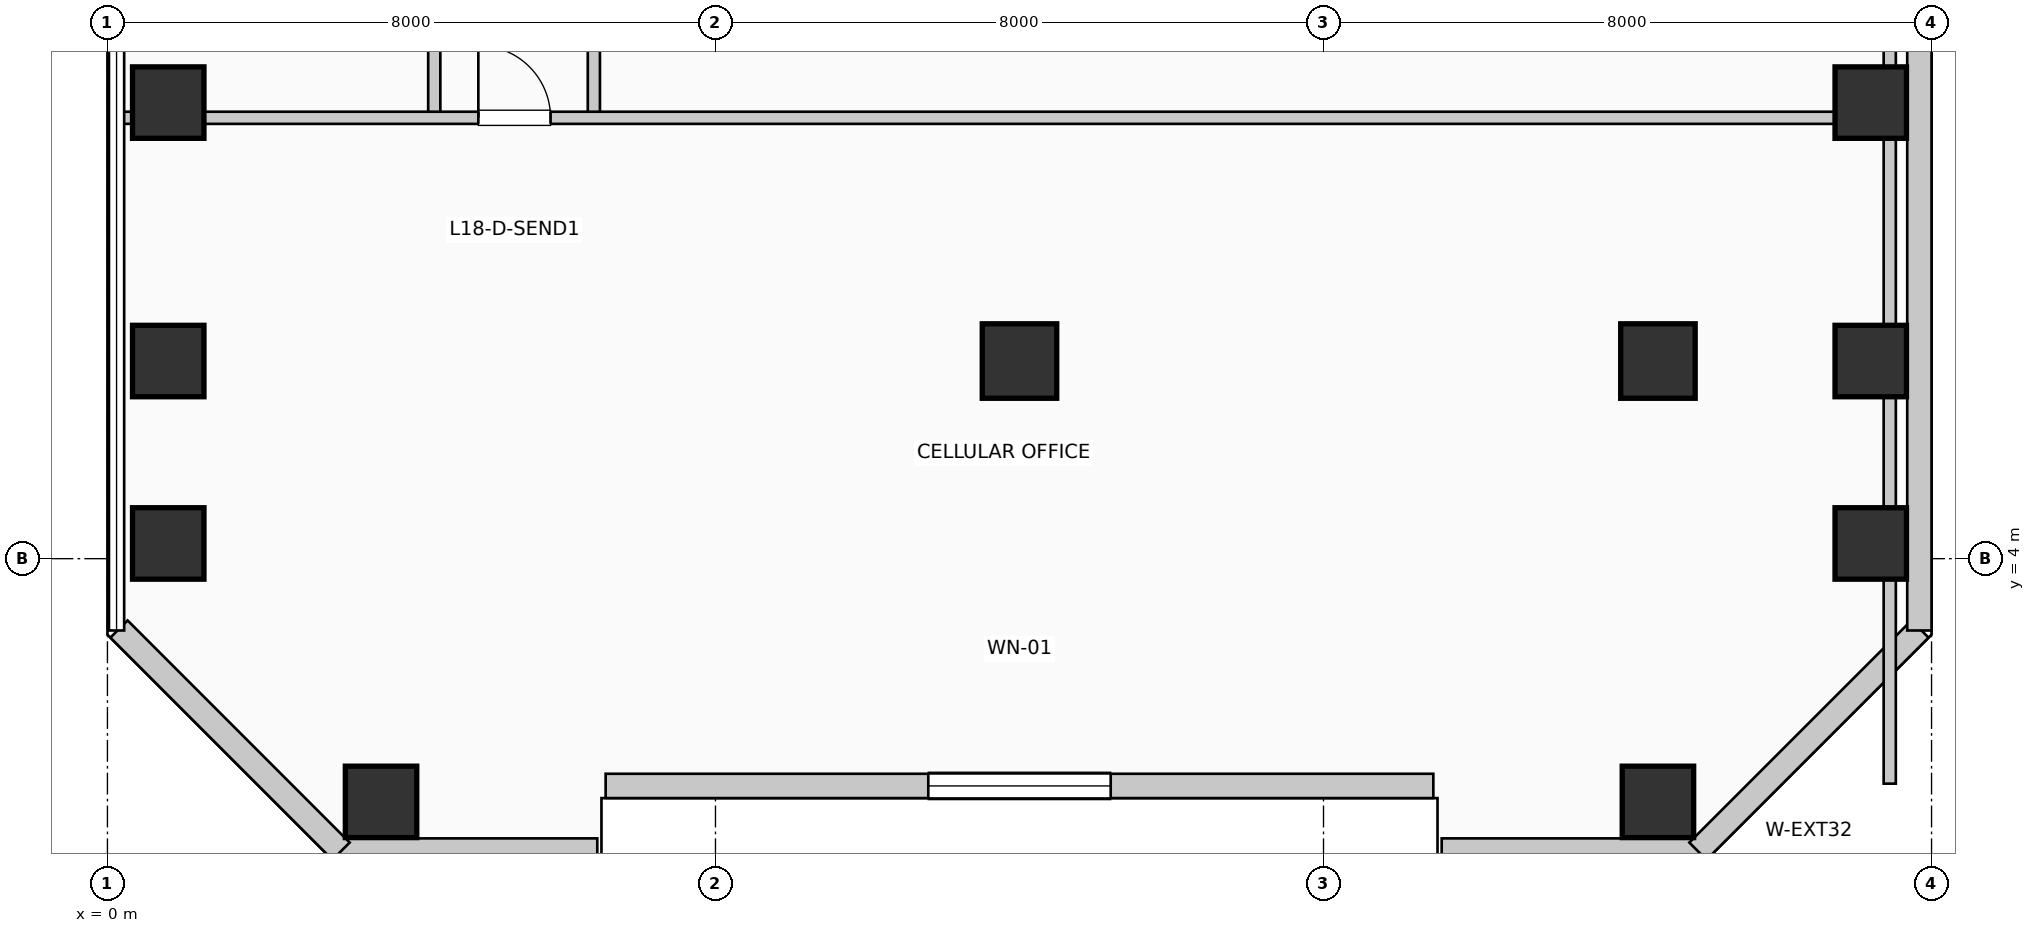
"""IFC4 building model, lengths in metres.
Left out: names, types, materials, properties, quantities, classifications, styles, units other than length and angle.
Written with IfcOpenShell. Run it as: python <this file> out.ifc"""

import sys

from ifc_helpers import new_model, si_unit, direction, frame, frame_2d, origin, origin_2d, place, context, subcontext, project, spatial, rectangle, extrude, element, fill, save


model = new_model("IFC4")
c1 = context("Model", 3, precision=1e-05, world=origin(), true_north=direction((0.0, 1.0)))
c2 = subcontext(c1, "Body", "Model", "MODEL_VIEW")
j1 = project(units=[si_unit("LENGTHUNIT", "METRE"), si_unit("PLANEANGLEUNIT", "RADIAN")], contexts=[c1])
p1 = place(None, origin())
s1 = spatial("IfcSite", under=j1, at=p1, CompositionType="ELEMENT")
p2 = place(p1, origin())
s2 = spatial("IfcBuilding", under=s1, at=p2, CompositionType="ELEMENT")
p3 = place(p2, frame((0.0, 0.0, 77.88)))
s3 = spatial("IfcBuildingStorey", under=s2, at=p3, CompositionType="ELEMENT", Elevation=77.88)
for number, where, z_axis, x_axis in (
    (1, (0.8, 4.2, 0.0), (0.0, 0.0, 1.0), (1.0, 0.0, 0.0)),
    (2, (0.8, 6.6, 0.0), (0.0, 0.0, 1.0), (1.0, 0.0, 0.0)),
    (3, (0.8, 10.0, 0.0), (0.0, 0.0, 1.0), (1.0, 0.0, 0.0)),
    (4, (3.6, 0.8, 0.0), (0.0, 0.0, 1.0), (1.0, 0.0, 0.0)),
):
    element("IfcColumn", number, at=place(p3, frame(where, z_axis=z_axis, x_axis=x_axis)), inside=s3, PredefinedType="COLUMN", context=c2, shape_type="SweptSolid", body=[
        extrude(rectangle(XDim=0.94, YDim=0.94, at=origin_2d()), origin(), (0.0, 0.0, 1.0), 3.96),
    ])
p4 = place(p3, frame((12.0, 6.6, 0.0), z_axis=(0.0, 0.0, 1.0), x_axis=(1.0, 0.0, 0.0)))
e5 = element("IfcColumn", 5, at=p4, inside=s3, PredefinedType="COLUMN", context=c2, shape_type="SweptSolid", body=[
    extrude(rectangle(XDim=0.98, YDim=0.98, at=origin_2d()), origin(), (0.0, 0.0, 1.0), 3.96),
])
p5 = place(p3, frame((20.4, 0.8, 0.0), z_axis=(0.0, 0.0, 1.0), x_axis=(1.0, 0.0, 0.0)))
e6 = element("IfcColumn", 6, at=p5, inside=s3, PredefinedType="COLUMN", context=c2, shape_type="SweptSolid", body=[
    extrude(rectangle(XDim=0.94, YDim=0.94, at=origin_2d()), origin(), (0.0, 0.0, 1.0), 3.96),
])
p6 = place(p3, frame((20.4, 6.6, 0.0), z_axis=(0.0, 0.0, 1.0), x_axis=(1.0, 0.0, 0.0)))
e7 = element("IfcColumn", 7, at=p6, inside=s3, PredefinedType="COLUMN", context=c2, shape_type="SweptSolid", body=[
    extrude(rectangle(XDim=0.98, YDim=0.98, at=origin_2d()), origin(), (0.0, 0.0, 1.0), 3.96),
])
for number, where, z_axis, x_axis in (
    (8, (23.2, 4.2, 0.0), (0.0, 0.0, 1.0), (1.0, 0.0, 0.0)),
    (9, (23.2, 6.6, 0.0), (0.0, 0.0, 1.0), (1.0, 0.0, 0.0)),
    (10, (23.2, 10.0, 0.0), (0.0, 0.0, 1.0), (1.0, 0.0, 0.0)),
):
    element("IfcColumn", number, at=place(p3, frame(where, z_axis=z_axis, x_axis=x_axis)), inside=s3, PredefinedType="COLUMN", context=c2, shape_type="SweptSolid", body=[
        extrude(rectangle(XDim=0.94, YDim=0.94, at=origin_2d()), origin(), (0.0, 0.0, 1.0), 3.96),
    ])
p7 = place(p3, frame((3.055, 0.16, 0.0), z_axis=(0.0, 0.0, 1.0), x_axis=(1.0, 0.0, 0.0)))
e11 = element("IfcWall", 11, at=p7, inside=s3, PredefinedType="SOLIDWALL", context=c2, shape_type="SweptSolid", body=[
    extrude(rectangle(XDim=3.39, YDim=0.32, at=frame_2d((1.695, 0.0))), origin(), (0.0, 0.0, 1.0), 3.71),
])
p8 = place(p3, frame((6.555, 1.01, 0.0), z_axis=(0.0, 0.0, 1.0), x_axis=(1.0, 0.0, 0.0)))
e12 = element("IfcWall", 12, at=p8, inside=s3, PredefinedType="SOLIDWALL", context=c2, shape_type="SweptSolid", body=[
    extrude(rectangle(XDim=10.89, YDim=0.32, at=frame_2d((5.445, 0.0))), origin(), (0.0, 0.0, 1.0), 3.71),
])
p9 = place(p8, frame((4.245, 0.0, 0.85)))
e13 = element("IfcOpeningElement", 13, at=p9, cuts=e12, PredefinedType="OPENING", context=c2, shape_type="SweptSolid", body=[
    extrude(rectangle(XDim=2.4, YDim=2.05, at=frame_2d((1.2, 1.025))), frame((0.0, 0.17, 0.0), z_axis=(0.0, -1.0, 0.0), x_axis=(1.0, 0.0, 0.0)), (0.0, 0.0, 1.0), 0.34),
])
p10 = place(p3, frame((17.555, 0.16, 0.0), z_axis=(0.0, 0.0, 1.0), x_axis=(1.0, 0.0, 0.0)))
e14 = element("IfcWall", 14, at=p10, inside=s3, PredefinedType="SOLIDWALL", context=c2, shape_type="SweptSolid", body=[
    extrude(rectangle(XDim=3.39, YDim=0.32, at=frame_2d((1.695, 0.0))), origin(), (0.0, 0.0, 1.0), 3.71),
])
p11 = place(p3, frame((20.926, 0.152, 0.0), z_axis=(0.0, 0.0, 1.0), x_axis=(0.707106781187, 0.707106781187, 0.0)))
e15 = element("IfcWall", 15, at=p11, inside=s3, PredefinedType="SOLIDWALL", context=c2, shape_type="SweptSolid", body=[
    extrude(rectangle(XDim=4.133, YDim=0.32, at=frame_2d((2.066, 0.0))), origin(), (0.0, 0.0, 1.0), 3.71),
])
p12 = place(p3, frame((23.84, 3.055, 0.0), z_axis=(0.0, 0.0, 1.0), x_axis=(0.0, 1.0, 0.0)))
e16 = element("IfcWall", 16, at=p12, inside=s3, PredefinedType="SOLIDWALL", context=c2, shape_type="SweptSolid", body=[
    extrude(rectangle(XDim=12.89, YDim=0.32, at=frame_2d((6.445, 0.0))), origin(), (0.0, 0.0, 1.0), 3.71),
])
p13 = place(p3, frame((0.152, 3.074, 0.0), z_axis=(0.0, 0.0, 1.0), x_axis=(0.707106781187, -0.707106781187, 0.0)))
e17 = element("IfcWall", 17, at=p13, inside=s3, PredefinedType="SOLIDWALL", context=c2, shape_type="SweptSolid", body=[
    extrude(rectangle(XDim=4.133, YDim=0.32, at=frame_2d((2.066, 0.0))), origin(), (0.0, 0.0, 1.0), 3.71),
])
p14 = place(p3, frame((4.3, 9.8, 0.0), z_axis=(0.0, 0.0, 1.0), x_axis=(0.0, 1.0, 0.0)))
e18 = element("IfcWall", 18, at=p14, inside=s3, PredefinedType="PARTITIONING", context=c2, shape_type="SweptSolid", body=[
    extrude(rectangle(XDim=19.6, YDim=0.16, at=frame_2d((9.8, 0.0))), origin(), (0.0, 0.0, 1.0), 3.71),
])
p15 = place(p14, frame((10.275, 0.0, 0.0), z_axis=(0.0, 0.0, 1.0), x_axis=(-1.0, 0.0, 0.0)))
e19 = element("IfcOpeningElement", 19, at=p15, cuts=e18, PredefinedType="OPENING", context=c2, shape_type="SweptSolid", body=[
    extrude(rectangle(XDim=0.95, YDim=2.15, at=frame_2d((0.475, 1.075))), frame((0.0, 0.09, 0.0), z_axis=(0.0, -1.0, 0.0), x_axis=(1.0, 0.0, 0.0)), (0.0, 0.0, 1.0), 0.18),
])
p16 = place(p3, frame((6.4, 9.8, 0.0), z_axis=(0.0, 0.0, 1.0), x_axis=(0.0, 1.0, 0.0)))
e20 = element("IfcWall", 20, at=p16, inside=s3, PredefinedType="PARTITIONING", context=c2, shape_type="SweptSolid", body=[
    extrude(rectangle(XDim=19.6, YDim=0.16, at=frame_2d((9.8, 0.0))), origin(), (0.0, 0.0, 1.0), 3.71),
])
p17 = place(p16, frame((1.387, 0.0, 0.0)))
e21 = element("IfcOpeningElement", 21, at=p17, cuts=e20, PredefinedType="OPENING", context=c2, shape_type="SweptSolid", body=[
    extrude(rectangle(XDim=0.95, YDim=2.15, at=frame_2d((0.475, 1.075))), frame((0.0, 0.09, 0.0), z_axis=(0.0, -1.0, 0.0), x_axis=(1.0, 0.0, 0.0)), (0.0, 0.0, 1.0), 0.18),
])
p18 = place(p16, frame((5.111, 0.0, 0.0)))
e22 = element("IfcOpeningElement", 22, at=p18, cuts=e20, PredefinedType="OPENING", context=c2, shape_type="SweptSolid", body=[
    extrude(rectangle(XDim=0.95, YDim=2.15, at=frame_2d((0.475, 1.075))), frame((0.0, 0.09, 0.0), z_axis=(0.0, -1.0, 0.0), x_axis=(1.0, 0.0, 0.0)), (0.0, 0.0, 1.0), 0.18),
])
p19 = place(p16, frame((8.933, 0.0, 0.0)))
e23 = element("IfcOpeningElement", 23, at=p19, cuts=e20, PredefinedType="OPENING", context=c2, shape_type="SweptSolid", body=[
    extrude(rectangle(XDim=0.95, YDim=2.15, at=frame_2d((0.475, 1.075))), frame((0.0, 0.09, 0.0), z_axis=(0.0, -1.0, 0.0), x_axis=(1.0, 0.0, 0.0)), (0.0, 0.0, 1.0), 0.18),
])
p20 = place(p16, frame((12.951, 0.0, 0.0)))
e24 = element("IfcOpeningElement", 24, at=p20, cuts=e20, PredefinedType="OPENING", context=c2, shape_type="SweptSolid", body=[
    extrude(rectangle(XDim=0.95, YDim=2.15, at=frame_2d((0.475, 1.075))), frame((0.0, 0.09, 0.0), z_axis=(0.0, -1.0, 0.0), x_axis=(1.0, 0.0, 0.0)), (0.0, 0.0, 1.0), 0.18),
])
p21 = place(p16, frame((17.067, 0.0, 0.0)))
e25 = element("IfcOpeningElement", 25, at=p21, cuts=e20, PredefinedType="OPENING", context=c2, shape_type="SweptSolid", body=[
    extrude(rectangle(XDim=0.95, YDim=2.15, at=frame_2d((0.475, 1.075))), frame((0.0, 0.09, 0.0), z_axis=(0.0, -1.0, 0.0), x_axis=(1.0, 0.0, 0.0)), (0.0, 0.0, 1.0), 0.18),
])
p22 = place(p3, frame((0.19, 9.8, 0.0), z_axis=(0.0, 0.0, 1.0), x_axis=(1.0, 0.0, 0.0)))
e26 = element("IfcWall", 26, at=p22, inside=s3, PredefinedType="PARTITIONING", context=c2, shape_type="SweptSolid", body=[
    extrude(rectangle(XDim=23.26, YDim=0.16, at=frame_2d((11.63, 0.0))), origin(), (0.0, 0.0, 1.0), 2.995),
])
p23 = place(p22, frame((4.69, 0.0, 0.0)))
e27 = element("IfcOpeningElement", 27, at=p23, cuts=e26, PredefinedType="OPENING", context=c2, shape_type="SweptSolid", body=[
    extrude(rectangle(XDim=0.95, YDim=2.15, at=frame_2d((0.475, 1.075))), frame((0.0, 0.09, 0.0), z_axis=(0.0, -1.0, 0.0), x_axis=(1.0, 0.0, 0.0)), (0.0, 0.0, 1.0), 0.18),
])
p24 = place(p3, frame((23.45, 1.04, 0.0), z_axis=(0.0, 0.0, 1.0), x_axis=(0.0, 1.0, 0.0)))
e28 = element("IfcWall", 28, at=p24, inside=s3, PredefinedType="PARTITIONING", context=c2, shape_type="SweptSolid", body=[
    extrude(rectangle(XDim=28.36, YDim=0.16, at=frame_2d((14.18, 0.0))), origin(), (0.0, 0.0, 1.0), 2.995),
])
p25 = place(p9, origin())
e29 = element("IfcWindow", 29, at=p25, inside=s3, PartitioningType="SINGLE_PANEL", PredefinedType="WINDOW", context=c2, shape_type="SweptSolid", body=[
    extrude(rectangle(XDim=2.4, YDim=2.05, at=frame_2d((1.2, 1.025))), frame((0.0, 0.03, 0.0), z_axis=(0.0, -1.0, 0.0), x_axis=(1.0, 0.0, 0.0)), (0.0, 0.0, 1.0), 0.06),
])
fill(e13, e29)
p26 = place(p23, origin())
e30 = element("IfcDoor", 30, at=p26, inside=s3, OperationType="SINGLE_SWING_LEFT", PredefinedType="DOOR", context=c2, shape_type="SweptSolid", body=[
    extrude(rectangle(XDim=0.95, YDim=2.15, at=frame_2d((0.475, 1.075))), frame((0.0, 0.025, 0.0), z_axis=(0.0, -1.0, 0.0), x_axis=(1.0, 0.0, 0.0)), (0.0, 0.0, 1.0), 0.05),
])
fill(e27, e30)
save(model, sys.argv[1])
